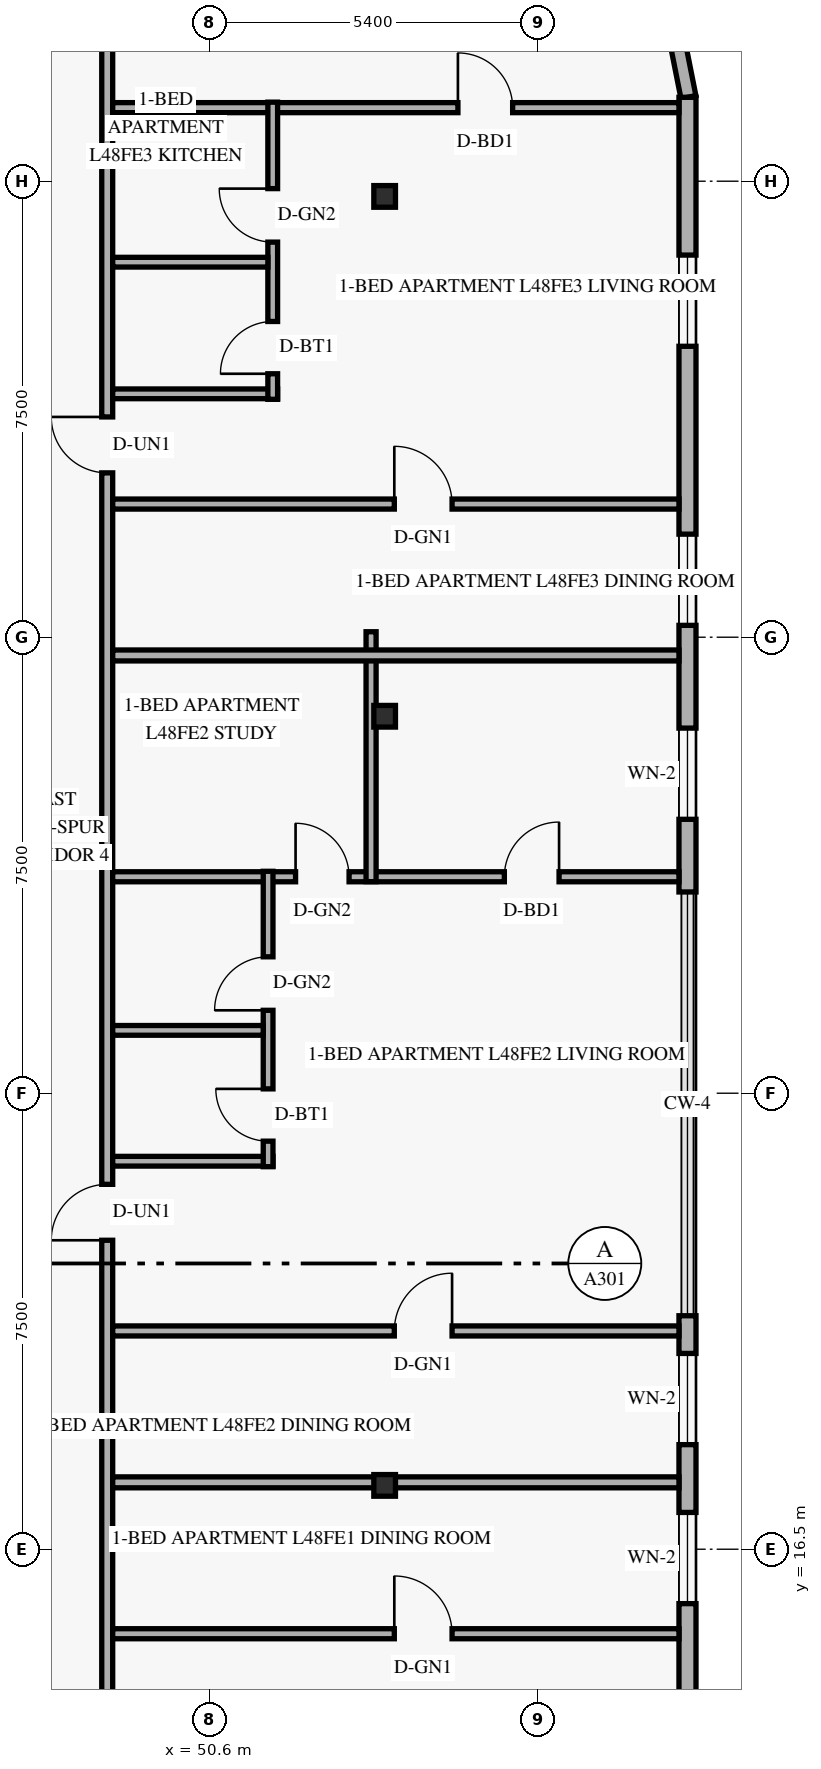
"""IFC4 building model, lengths in metres.
Left out: names, types, materials, properties, quantities, classifications, styles, units other than length and angle.
Written with IfcOpenShell. Run it as: python <this file> out.ifc"""

import sys

from ifc_helpers import new_model, si_unit, direction, frame, frame_2d, origin, origin_2d, place, context, subcontext, project, spatial, rectangle, hollow_rectangle, extrude, element, fill, save


model = new_model("IFC4")
c1 = context("Model", 3, precision=1e-05, world=origin(), true_north=direction((0.0, 1.0)))
c2 = subcontext(c1, "Body", "Model", "MODEL_VIEW")
j1 = project(units=[si_unit("LENGTHUNIT", "METRE"), si_unit("PLANEANGLEUNIT", "RADIAN")], contexts=[c1])
p1 = place(None, origin())
s1 = spatial("IfcSite", under=j1, at=p1, CompositionType="ELEMENT")
p2 = place(p1, origin())
s2 = spatial("IfcBuilding", under=s1, at=p2, CompositionType="ELEMENT")
p3 = place(p2, frame((0.0, 0.0, 184.8)))
s3 = spatial("IfcBuildingStorey", under=s2, at=p3, CompositionType="ELEMENT", Elevation=184.8)
for number, where, z_axis, x_axis in (
    (1, (53.375, 17.55, 0.0), (0.058, 0.0, 0.998), (0.0, 1.0, 0.0)),
    (2, (53.375, 30.2, 0.0), (0.058, 0.0, 0.998), (0.0, 1.0, 0.0)),
    (3, (53.375, 38.75, 0.0), (0.058, 0.0, 0.998), (0.0, 1.0, 0.0)),
):
    element("IfcColumn", number, at=place(p3, frame(where, z_axis=z_axis, x_axis=x_axis)), inside=s3, PredefinedType="COLUMN", context=c2, shape_type="SweptSolid", body=[
        extrude(hollow_rectangle(XDim=0.356, YDim=0.356, WallThickness=0.016, at=origin_2d()), origin(), (0.0, 0.0, 1.0), 3.606),
    ])
p4 = place(p3, frame((58.476, 40.384, 0.0), z_axis=(0.0, 0.0, 1.0), x_axis=(-0.19496651342, 0.980809899341, 0.0)))
e4 = element("IfcWall", 4, at=p4, inside=s3, PredefinedType="SOLIDWALL", context=c2, shape_type="SweptSolid", body=[
    extrude(rectangle(XDim=1.389, YDim=0.25, at=frame_2d((0.694, 0.0))), origin(), (0.0, 0.0, 1.0), 3.36),
])
p5 = place(p3, frame((58.46, 7.62, 0.0), z_axis=(0.0, 0.0, 1.0), x_axis=(0.0, 1.0, 0.0)))
e5 = element("IfcWall", 5, at=p5, inside=s3, PredefinedType="SOLIDWALL", context=c2, shape_type="SweptSolid", body=[
    extrude(rectangle(XDim=12.72, YDim=0.28, at=frame_2d((6.36, 0.0))), origin(), (0.0, 0.0, 1.0), 3.36),
])
p6 = place(p5, frame((2.995, 0.0, 0.85)))
e6 = element("IfcOpeningElement", 6, at=p6, cuts=e5, PredefinedType="OPENING", context=c2, shape_type="SweptSolid", body=[
    extrude(rectangle(XDim=1.5, YDim=1.55, at=frame_2d((0.75, 0.775))), frame((0.0, 0.15, 0.0), z_axis=(0.0, -1.0, 0.0), x_axis=(1.0, 0.0, 0.0)), (0.0, 0.0, 1.0), 0.3),
])
p7 = place(p5, frame((7.985, 0.0, 0.85)))
e7 = element("IfcOpeningElement", 7, at=p7, cuts=e5, PredefinedType="OPENING", context=c2, shape_type="SweptSolid", body=[
    extrude(rectangle(XDim=1.5, YDim=1.55, at=frame_2d((0.75, 0.775))), frame((0.0, 0.15, 0.0), z_axis=(0.0, -1.0, 0.0), x_axis=(1.0, 0.0, 0.0)), (0.0, 0.0, 1.0), 0.3),
])
p8 = place(p5, frame((10.6, 0.0, 0.85)))
e8 = element("IfcOpeningElement", 8, at=p8, cuts=e5, PredefinedType="OPENING", context=c2, shape_type="SweptSolid", body=[
    extrude(rectangle(XDim=1.5, YDim=1.55, at=frame_2d((0.75, 0.775))), frame((0.0, 0.15, 0.0), z_axis=(0.0, -1.0, 0.0), x_axis=(1.0, 0.0, 0.0)), (0.0, 0.0, 1.0), 0.3),
])
p9 = place(p3, frame((58.46, 27.31, 0.0), z_axis=(0.0, 0.0, 1.0), x_axis=(0.0, 1.0, 0.0)))
e9 = element("IfcWall", 9, at=p9, inside=s3, PredefinedType="SOLIDWALL", context=c2, shape_type="SweptSolid", body=[
    extrude(rectangle(XDim=13.07, YDim=0.28, at=frame_2d((6.535, 0.0))), origin(), (0.0, 0.0, 1.0), 3.36),
])
p10 = place(p9, frame((1.195, 0.0, 0.85)))
e10 = element("IfcOpeningElement", 10, at=p10, cuts=e9, PredefinedType="OPENING", context=c2, shape_type="SweptSolid", body=[
    extrude(rectangle(XDim=1.5, YDim=1.55, at=frame_2d((0.75, 0.775))), frame((0.0, 0.15, 0.0), z_axis=(0.0, -1.0, 0.0), x_axis=(1.0, 0.0, 0.0)), (0.0, 0.0, 1.0), 0.3),
])
p11 = place(p9, frame((4.385, 0.0, 0.85)))
e11 = element("IfcOpeningElement", 11, at=p11, cuts=e9, PredefinedType="OPENING", context=c2, shape_type="SweptSolid", body=[
    extrude(rectangle(XDim=1.5, YDim=1.55, at=frame_2d((0.75, 0.775))), frame((0.0, 0.15, 0.0), z_axis=(0.0, -1.0, 0.0), x_axis=(1.0, 0.0, 0.0)), (0.0, 0.0, 1.0), 0.3),
])
p12 = place(p9, frame((8.975, 0.0, 0.85)))
e12 = element("IfcOpeningElement", 12, at=p12, cuts=e9, PredefinedType="OPENING", context=c2, shape_type="SweptSolid", body=[
    extrude(rectangle(XDim=1.5, YDim=1.55, at=frame_2d((0.75, 0.775))), frame((0.0, 0.15, 0.0), z_axis=(0.0, -1.0, 0.0), x_axis=(1.0, 0.0, 0.0)), (0.0, 0.0, 1.0), 0.3),
])
p13 = place(p3, frame((48.917, 4.28, 0.0), z_axis=(0.0, 0.0, 1.0), x_axis=(0.0, 1.0, 0.0)))
e13 = element("IfcWall", 13, at=p13, inside=s3, PredefinedType="STANDARD", context=c2, shape_type="SweptSolid", body=[
    extrude(rectangle(XDim=39.44, YDim=0.18, at=frame_2d((19.72, 0.0))), origin(), (0.0, 0.0, 1.0), 2.73),
])
p14 = place(p13, frame((8.52, 0.0, 0.0)))
e14 = element("IfcOpeningElement", 14, at=p14, cuts=e13, PredefinedType="OPENING", context=c2, shape_type="SweptSolid", body=[
    extrude(rectangle(XDim=0.92, YDim=2.15, at=frame_2d((0.46, 1.075))), frame((0.0, 0.1, 0.0), z_axis=(0.0, -1.0, 0.0), x_axis=(1.0, 0.0, 0.0)), (0.0, 0.0, 1.0), 0.2),
])
p15 = place(p13, frame((17.302, 0.0, 0.0)))
e15 = element("IfcOpeningElement", 15, at=p15, cuts=e13, PredefinedType="OPENING", context=c2, shape_type="SweptSolid", body=[
    extrude(rectangle(XDim=0.92, YDim=2.15, at=frame_2d((0.46, 1.075))), frame((0.0, 0.1, 0.0), z_axis=(0.0, -1.0, 0.0), x_axis=(1.0, 0.0, 0.0)), (0.0, 0.0, 1.0), 0.2),
])
p16 = place(p13, frame((29.923, 0.0, 0.0)))
e16 = element("IfcOpeningElement", 16, at=p16, cuts=e13, PredefinedType="OPENING", context=c2, shape_type="SweptSolid", body=[
    extrude(rectangle(XDim=0.92, YDim=2.15, at=frame_2d((0.46, 1.075))), frame((0.0, 0.1, 0.0), z_axis=(0.0, -1.0, 0.0), x_axis=(1.0, 0.0, 0.0)), (0.0, 0.0, 1.0), 0.2),
])
p17 = place(p3, frame((49.007, 15.11, 0.0), z_axis=(0.0, 0.0, 1.0), x_axis=(1.0, 0.0, 0.0)))
e17 = element("IfcWall", 17, at=p17, inside=s3, PredefinedType="PARTITIONING", context=c2, shape_type="SweptSolid", body=[
    extrude(rectangle(XDim=9.313, YDim=0.165, at=frame_2d((4.656, 0.0))), origin(), (0.0, 0.0, 1.0), 2.879),
])
p18 = place(p17, frame((4.632, 0.0, 0.0)))
e18 = element("IfcOpeningElement", 18, at=p18, cuts=e17, PredefinedType="OPENING", context=c2, shape_type="SweptSolid", body=[
    extrude(rectangle(XDim=0.95, YDim=2.15, at=frame_2d((0.475, 1.075))), frame((0.0, 0.093, 0.0), z_axis=(0.0, -1.0, 0.0), x_axis=(1.0, 0.0, 0.0)), (0.0, 0.0, 1.0), 0.185),
])
p19 = place(p3, frame((49.007, 17.6, 0.0), z_axis=(0.0, 0.0, 1.0), x_axis=(1.0, 0.0, 0.0)))
e19 = element("IfcWall", 19, at=p19, inside=s3, PredefinedType="PARTITIONING", context=c2, shape_type="SweptSolid", body=[
    extrude(rectangle(XDim=9.313, YDim=0.18, at=frame_2d((4.656, 0.0))), origin(), (0.0, 0.0, 1.0), 2.73),
])
p20 = place(p3, frame((49.007, 27.56, 0.0), z_axis=(0.0, 0.0, 1.0), x_axis=(1.0, 0.0, 0.0)))
e20 = element("IfcWall", 20, at=p20, inside=s3, PredefinedType="PARTITIONING", context=c2, shape_type="SweptSolid", body=[
    extrude(rectangle(XDim=9.313, YDim=0.165, at=frame_2d((4.656, 0.0))), origin(), (0.0, 0.0, 1.0), 2.879),
])
p21 = place(p20, frame((3.008, 0.0, 0.0)))
e21 = element("IfcOpeningElement", 21, at=p21, cuts=e20, PredefinedType="OPENING", context=c2, shape_type="SweptSolid", body=[
    extrude(rectangle(XDim=0.88, YDim=2.12, at=frame_2d((0.44, 1.06))), frame((0.0, 0.093, 0.0), z_axis=(0.0, -1.0, 0.0), x_axis=(1.0, 0.0, 0.0)), (0.0, 0.0, 1.0), 0.185),
])
p22 = place(p20, frame((6.441, 0.0, 0.0)))
e22 = element("IfcOpeningElement", 22, at=p22, cuts=e20, PredefinedType="OPENING", context=c2, shape_type="SweptSolid", body=[
    extrude(rectangle(XDim=0.9, YDim=2.14, at=frame_2d((0.45, 1.07))), frame((0.0, 0.093, 0.0), z_axis=(0.0, -1.0, 0.0), x_axis=(1.0, 0.0, 0.0)), (0.0, 0.0, 1.0), 0.185),
])
p23 = place(p3, frame((49.007, 22.882, 0.0), z_axis=(0.0, 0.0, 1.0), x_axis=(1.0, 0.0, 0.0)))
e23 = element("IfcWall", 23, at=p23, inside=s3, PredefinedType="PLUMBINGWALL", context=c2, shape_type="SweptSolid", body=[
    extrude(rectangle(XDim=2.636, YDim=0.16, at=frame_2d((1.318, 0.0))), origin(), (0.0, 0.0, 1.0), 3.36),
])
p24 = place(p3, frame((51.563, 22.792, 0.0), z_axis=(0.0, 0.0, 1.0), x_axis=(0.0, 1.0, 0.0)))
e24 = element("IfcWall", 24, at=p24, inside=s3, PredefinedType="PLUMBINGWALL", context=c2, shape_type="SweptSolid", body=[
    extrude(rectangle(XDim=4.858, YDim=0.16, at=frame_2d((2.429, 0.0))), origin(), (0.0, 0.0, 1.0), 3.36),
])
p25 = place(p24, frame((0.42, 0.0, 0.0)))
e25 = element("IfcOpeningElement", 25, at=p25, cuts=e24, PredefinedType="OPENING", context=c2, shape_type="SweptSolid", body=[
    extrude(rectangle(XDim=0.86, YDim=2.12, at=frame_2d((0.43, 1.06))), frame((0.0, 0.09, 0.0), z_axis=(0.0, -1.0, 0.0), x_axis=(1.0, 0.0, 0.0)), (0.0, 0.0, 1.0), 0.18),
])
p26 = place(p24, frame((2.572, 0.0, 0.0)))
e26 = element("IfcOpeningElement", 26, at=p26, cuts=e24, PredefinedType="OPENING", context=c2, shape_type="SweptSolid", body=[
    extrude(rectangle(XDim=0.88, YDim=2.12, at=frame_2d((0.44, 1.06))), frame((0.0, 0.09, 0.0), z_axis=(0.0, -1.0, 0.0), x_axis=(1.0, 0.0, 0.0)), (0.0, 0.0, 1.0), 0.18),
])
p27 = place(p3, frame((49.007, 25.034, 0.0), z_axis=(0.0, 0.0, 1.0), x_axis=(1.0, 0.0, 0.0)))
e27 = element("IfcWall", 27, at=p27, inside=s3, PredefinedType="PLUMBINGWALL", context=c2, shape_type="SweptSolid", body=[
    extrude(rectangle(XDim=2.476, YDim=0.16, at=frame_2d((1.238, 0.0))), origin(), (0.0, 0.0, 1.0), 3.36),
])
p28 = place(p3, frame((49.007, 20.09, 0.0), z_axis=(0.0, 0.0, 1.0), x_axis=(1.0, 0.0, 0.0)))
e28 = element("IfcWall", 28, at=p28, inside=s3, PredefinedType="PARTITIONING", context=c2, shape_type="SweptSolid", body=[
    extrude(rectangle(XDim=9.313, YDim=0.165, at=frame_2d((4.656, 0.0))), origin(), (0.0, 0.0, 1.0), 2.879),
])
p29 = place(p28, frame((4.632, 0.0, 0.0)))
e29 = element("IfcOpeningElement", 29, at=p29, cuts=e28, PredefinedType="OPENING", context=c2, shape_type="SweptSolid", body=[
    extrude(rectangle(XDim=0.95, YDim=2.15, at=frame_2d((0.475, 1.075))), frame((0.0, 0.093, 0.0), z_axis=(0.0, -1.0, 0.0), x_axis=(1.0, 0.0, 0.0)), (0.0, 0.0, 1.0), 0.185),
])
p30 = place(p3, frame((53.256, 27.48, 0.0), z_axis=(0.0, 0.0, 1.0), x_axis=(0.0, 1.0, 0.0)))
e30 = element("IfcWall", 30, at=p30, inside=s3, PredefinedType="PARTITIONING", context=c2, shape_type="SweptSolid", body=[
    extrude(rectangle(XDim=4.11, YDim=0.165, at=frame_2d((2.055, 0.0))), origin(), (0.0, 0.0, 1.0), 2.73),
])
p31 = place(p3, frame((49.007, 31.2, 0.0), z_axis=(0.0, 0.0, 1.0), x_axis=(1.0, 0.0, 0.0)))
e31 = element("IfcWall", 31, at=p31, inside=s3, PredefinedType="PARTITIONING", context=c2, shape_type="SweptSolid", body=[
    extrude(rectangle(XDim=9.313, YDim=0.18, at=frame_2d((4.656, 0.0))), origin(), (0.0, 0.0, 1.0), 2.879),
])
p32 = place(p3, frame((49.007, 40.21, 0.0), z_axis=(0.0, 0.0, 1.0), x_axis=(1.0, 0.0, 0.0)))
e32 = element("IfcWall", 32, at=p32, inside=s3, PredefinedType="PARTITIONING", context=c2, shape_type="SweptSolid", body=[
    extrude(rectangle(XDim=9.313, YDim=0.165, at=frame_2d((4.656, 0.0))), origin(), (0.0, 0.0, 1.0), 2.879),
])
p33 = place(p32, frame((5.677, 0.0, 0.0)))
e33 = element("IfcOpeningElement", 33, at=p33, cuts=e32, PredefinedType="OPENING", context=c2, shape_type="SweptSolid", body=[
    extrude(rectangle(XDim=0.9, YDim=2.14, at=frame_2d((0.45, 1.07))), frame((0.0, 0.093, 0.0), z_axis=(0.0, -1.0, 0.0), x_axis=(1.0, 0.0, 0.0)), (0.0, 0.0, 1.0), 0.185),
])
p34 = place(p3, frame((49.007, 35.503, 0.0), z_axis=(0.0, 0.0, 1.0), x_axis=(1.0, 0.0, 0.0)))
e34 = element("IfcWall", 34, at=p34, inside=s3, PredefinedType="PLUMBINGWALL", context=c2, shape_type="SweptSolid", body=[
    extrude(rectangle(XDim=2.712, YDim=0.16, at=frame_2d((1.356, 0.0))), origin(), (0.0, 0.0, 1.0), 3.36),
])
p35 = place(p3, frame((51.639, 35.413, 0.0), z_axis=(0.0, 0.0, 1.0), x_axis=(0.0, 1.0, 0.0)))
e35 = element("IfcWall", 35, at=p35, inside=s3, PredefinedType="PLUMBINGWALL", context=c2, shape_type="SweptSolid", body=[
    extrude(rectangle(XDim=4.887, YDim=0.16, at=frame_2d((2.443, 0.0))), origin(), (0.0, 0.0, 1.0), 2.73),
])
p36 = place(p35, frame((0.42, 0.0, 0.0)))
e36 = element("IfcOpeningElement", 36, at=p36, cuts=e35, PredefinedType="OPENING", context=c2, shape_type="SweptSolid", body=[
    extrude(rectangle(XDim=0.86, YDim=2.12, at=frame_2d((0.43, 1.06))), frame((0.0, 0.09, 0.0), z_axis=(0.0, -1.0, 0.0), x_axis=(1.0, 0.0, 0.0)), (0.0, 0.0, 1.0), 0.18),
])
p37 = place(p35, frame((2.585, 0.0, 0.0)))
e37 = element("IfcOpeningElement", 37, at=p37, cuts=e35, PredefinedType="OPENING", context=c2, shape_type="SweptSolid", body=[
    extrude(rectangle(XDim=0.88, YDim=2.12, at=frame_2d((0.44, 1.06))), frame((0.0, 0.09, 0.0), z_axis=(0.0, -1.0, 0.0), x_axis=(1.0, 0.0, 0.0)), (0.0, 0.0, 1.0), 0.18),
])
p38 = place(p3, frame((49.007, 37.668, 0.0), z_axis=(0.0, 0.0, 1.0), x_axis=(1.0, 0.0, 0.0)))
e38 = element("IfcWall", 38, at=p38, inside=s3, PredefinedType="PLUMBINGWALL", context=c2, shape_type="SweptSolid", body=[
    extrude(rectangle(XDim=2.552, YDim=0.16, at=frame_2d((1.276, 0.0))), origin(), (0.0, 0.0, 1.0), 3.36),
])
p39 = place(p3, frame((49.007, 33.69, 0.0), z_axis=(0.0, 0.0, 1.0), x_axis=(1.0, 0.0, 0.0)))
e39 = element("IfcWall", 39, at=p39, inside=s3, PredefinedType="PARTITIONING", context=c2, shape_type="SweptSolid", body=[
    extrude(rectangle(XDim=9.313, YDim=0.165, at=frame_2d((4.656, 0.0))), origin(), (0.0, 0.0, 1.0), 2.879),
])
p40 = place(p39, frame((4.632, 0.0, 0.0)))
e40 = element("IfcOpeningElement", 40, at=p40, cuts=e39, PredefinedType="OPENING", context=c2, shape_type="SweptSolid", body=[
    extrude(rectangle(XDim=0.95, YDim=2.15, at=frame_2d((0.475, 1.075))), frame((0.0, 0.093, 0.0), z_axis=(0.0, -1.0, 0.0), x_axis=(1.0, 0.0, 0.0)), (0.0, 0.0, 1.0), 0.185),
])
p41 = place(p7, origin())
e41 = element("IfcWindow", 41, at=p41, inside=s3, PartitioningType="SINGLE_PANEL", PredefinedType="WINDOW", context=c2, shape_type="SweptSolid", body=[
    extrude(rectangle(XDim=1.5, YDim=1.55, at=frame_2d((0.75, 0.775))), frame((0.0, 0.03, 0.0), z_axis=(0.0, -1.0, 0.0), x_axis=(1.0, 0.0, 0.0)), (0.0, 0.0, 1.0), 0.06),
])
fill(e7, e41)
p42 = place(p8, origin())
e42 = element("IfcWindow", 42, at=p42, inside=s3, PartitioningType="SINGLE_PANEL", PredefinedType="WINDOW", context=c2, shape_type="SweptSolid", body=[
    extrude(rectangle(XDim=1.5, YDim=1.55, at=frame_2d((0.75, 0.775))), frame((0.0, 0.03, 0.0), z_axis=(0.0, -1.0, 0.0), x_axis=(1.0, 0.0, 0.0)), (0.0, 0.0, 1.0), 0.06),
])
fill(e8, e42)
p43 = place(p10, origin())
e43 = element("IfcWindow", 43, at=p43, inside=s3, PartitioningType="SINGLE_PANEL", PredefinedType="WINDOW", context=c2, shape_type="SweptSolid", body=[
    extrude(rectangle(XDim=1.5, YDim=1.55, at=frame_2d((0.75, 0.775))), frame((0.0, 0.03, 0.0), z_axis=(0.0, -1.0, 0.0), x_axis=(1.0, 0.0, 0.0)), (0.0, 0.0, 1.0), 0.06),
])
fill(e10, e43)
p44 = place(p11, origin())
e44 = element("IfcWindow", 44, at=p44, inside=s3, PartitioningType="SINGLE_PANEL", PredefinedType="WINDOW", context=c2, shape_type="SweptSolid", body=[
    extrude(rectangle(XDim=1.5, YDim=1.55, at=frame_2d((0.75, 0.775))), frame((0.0, 0.03, 0.0), z_axis=(0.0, -1.0, 0.0), x_axis=(1.0, 0.0, 0.0)), (0.0, 0.0, 1.0), 0.06),
])
fill(e11, e44)
p45 = place(p12, origin())
e45 = element("IfcWindow", 45, at=p45, inside=s3, PartitioningType="SINGLE_PANEL", PredefinedType="WINDOW", context=c2, shape_type="SweptSolid", body=[
    extrude(rectangle(XDim=1.5, YDim=1.55, at=frame_2d((0.75, 0.775))), frame((0.0, 0.03, 0.0), z_axis=(0.0, -1.0, 0.0), x_axis=(1.0, 0.0, 0.0)), (0.0, 0.0, 1.0), 0.06),
])
fill(e12, e45)
p46 = place(p18, origin())
e46 = element("IfcDoor", 46, at=p46, inside=s3, OperationType="SINGLE_SWING_LEFT", PredefinedType="DOOR", context=c2, shape_type="SweptSolid", body=[
    extrude(rectangle(XDim=0.95, YDim=2.15, at=frame_2d((0.475, 1.075))), frame((0.0, 0.025, 0.0), z_axis=(0.0, -1.0, 0.0), x_axis=(1.0, 0.0, 0.0)), (0.0, 0.0, 1.0), 0.05),
])
fill(e18, e46)
p47 = place(p29, origin())
e47 = element("IfcDoor", 47, at=p47, inside=s3, OperationType="SINGLE_SWING_RIGHT", PredefinedType="DOOR", context=c2, shape_type="SweptSolid", body=[
    extrude(rectangle(XDim=0.95, YDim=2.15, at=frame_2d((0.475, 1.075))), frame((0.0, 0.025, 0.0), z_axis=(0.0, -1.0, 0.0), x_axis=(1.0, 0.0, 0.0)), (0.0, 0.0, 1.0), 0.05),
])
fill(e29, e47)
p48 = place(p15, origin())
e48 = element("IfcDoor", 48, at=p48, inside=s3, OperationType="SINGLE_SWING_LEFT", PredefinedType="DOOR", context=c2, shape_type="SweptSolid", body=[
    extrude(rectangle(XDim=0.92, YDim=2.15, at=frame_2d((0.46, 1.075))), frame((0.0, 0.025, 0.0), z_axis=(0.0, -1.0, 0.0), x_axis=(1.0, 0.0, 0.0)), (0.0, 0.0, 1.0), 0.05),
])
fill(e15, e48)
p49 = place(p25, origin())
e49 = element("IfcDoor", 49, at=p49, inside=s3, OperationType="SINGLE_SWING_RIGHT", PredefinedType="DOOR", context=c2, shape_type="SweptSolid", body=[
    extrude(rectangle(XDim=0.86, YDim=2.12, at=frame_2d((0.43, 1.06))), frame((0.0, 0.025, 0.0), z_axis=(0.0, -1.0, 0.0), x_axis=(1.0, 0.0, 0.0)), (0.0, 0.0, 1.0), 0.05),
])
fill(e25, e49)
p50 = place(p26, origin())
e50 = element("IfcDoor", 50, at=p50, inside=s3, OperationType="SINGLE_SWING_LEFT", PredefinedType="DOOR", context=c2, shape_type="SweptSolid", body=[
    extrude(rectangle(XDim=0.88, YDim=2.12, at=frame_2d((0.44, 1.06))), frame((0.0, 0.025, 0.0), z_axis=(0.0, -1.0, 0.0), x_axis=(1.0, 0.0, 0.0)), (0.0, 0.0, 1.0), 0.05),
])
fill(e26, e50)
p51 = place(p21, origin())
e51 = element("IfcDoor", 51, at=p51, inside=s3, OperationType="SINGLE_SWING_LEFT", PredefinedType="DOOR", context=c2, shape_type="SweptSolid", body=[
    extrude(rectangle(XDim=0.88, YDim=2.12, at=frame_2d((0.44, 1.06))), frame((0.0, 0.025, 0.0), z_axis=(0.0, -1.0, 0.0), x_axis=(1.0, 0.0, 0.0)), (0.0, 0.0, 1.0), 0.05),
])
fill(e21, e51)
p52 = place(p22, origin())
e52 = element("IfcDoor", 52, at=p52, inside=s3, OperationType="SINGLE_SWING_RIGHT", PredefinedType="DOOR", context=c2, shape_type="SweptSolid", body=[
    extrude(rectangle(XDim=0.9, YDim=2.14, at=frame_2d((0.45, 1.07))), frame((0.0, 0.025, 0.0), z_axis=(0.0, -1.0, 0.0), x_axis=(1.0, 0.0, 0.0)), (0.0, 0.0, 1.0), 0.05),
])
fill(e22, e52)
p53 = place(p40, origin())
e53 = element("IfcDoor", 53, at=p53, inside=s3, OperationType="SINGLE_SWING_LEFT", PredefinedType="DOOR", context=c2, shape_type="SweptSolid", body=[
    extrude(rectangle(XDim=0.95, YDim=2.15, at=frame_2d((0.475, 1.075))), frame((0.0, 0.025, 0.0), z_axis=(0.0, -1.0, 0.0), x_axis=(1.0, 0.0, 0.0)), (0.0, 0.0, 1.0), 0.05),
])
fill(e40, e53)
p54 = place(p16, origin())
e54 = element("IfcDoor", 54, at=p54, inside=s3, OperationType="SINGLE_SWING_RIGHT", PredefinedType="DOOR", context=c2, shape_type="SweptSolid", body=[
    extrude(rectangle(XDim=0.92, YDim=2.15, at=frame_2d((0.46, 1.075))), frame((0.0, 0.025, 0.0), z_axis=(0.0, -1.0, 0.0), x_axis=(1.0, 0.0, 0.0)), (0.0, 0.0, 1.0), 0.05),
])
fill(e16, e54)
p55 = place(p36, origin())
e55 = element("IfcDoor", 55, at=p55, inside=s3, OperationType="SINGLE_SWING_LEFT", PredefinedType="DOOR", context=c2, shape_type="SweptSolid", body=[
    extrude(rectangle(XDim=0.86, YDim=2.12, at=frame_2d((0.43, 1.06))), frame((0.0, 0.025, 0.0), z_axis=(0.0, -1.0, 0.0), x_axis=(1.0, 0.0, 0.0)), (0.0, 0.0, 1.0), 0.05),
])
fill(e36, e55)
p56 = place(p37, origin())
e56 = element("IfcDoor", 56, at=p56, inside=s3, OperationType="SINGLE_SWING_RIGHT", PredefinedType="DOOR", context=c2, shape_type="SweptSolid", body=[
    extrude(rectangle(XDim=0.88, YDim=2.12, at=frame_2d((0.44, 1.06))), frame((0.0, 0.025, 0.0), z_axis=(0.0, -1.0, 0.0), x_axis=(1.0, 0.0, 0.0)), (0.0, 0.0, 1.0), 0.05),
])
fill(e37, e56)
p57 = place(p33, origin())
e57 = element("IfcDoor", 57, at=p57, inside=s3, OperationType="SINGLE_SWING_LEFT", PredefinedType="DOOR", context=c2, shape_type="SweptSolid", body=[
    extrude(rectangle(XDim=0.9, YDim=2.14, at=frame_2d((0.45, 1.07))), frame((0.0, 0.025, 0.0), z_axis=(0.0, -1.0, 0.0), x_axis=(1.0, 0.0, 0.0)), (0.0, 0.0, 1.0), 0.05),
])
fill(e33, e57)
save(model, sys.argv[1])
